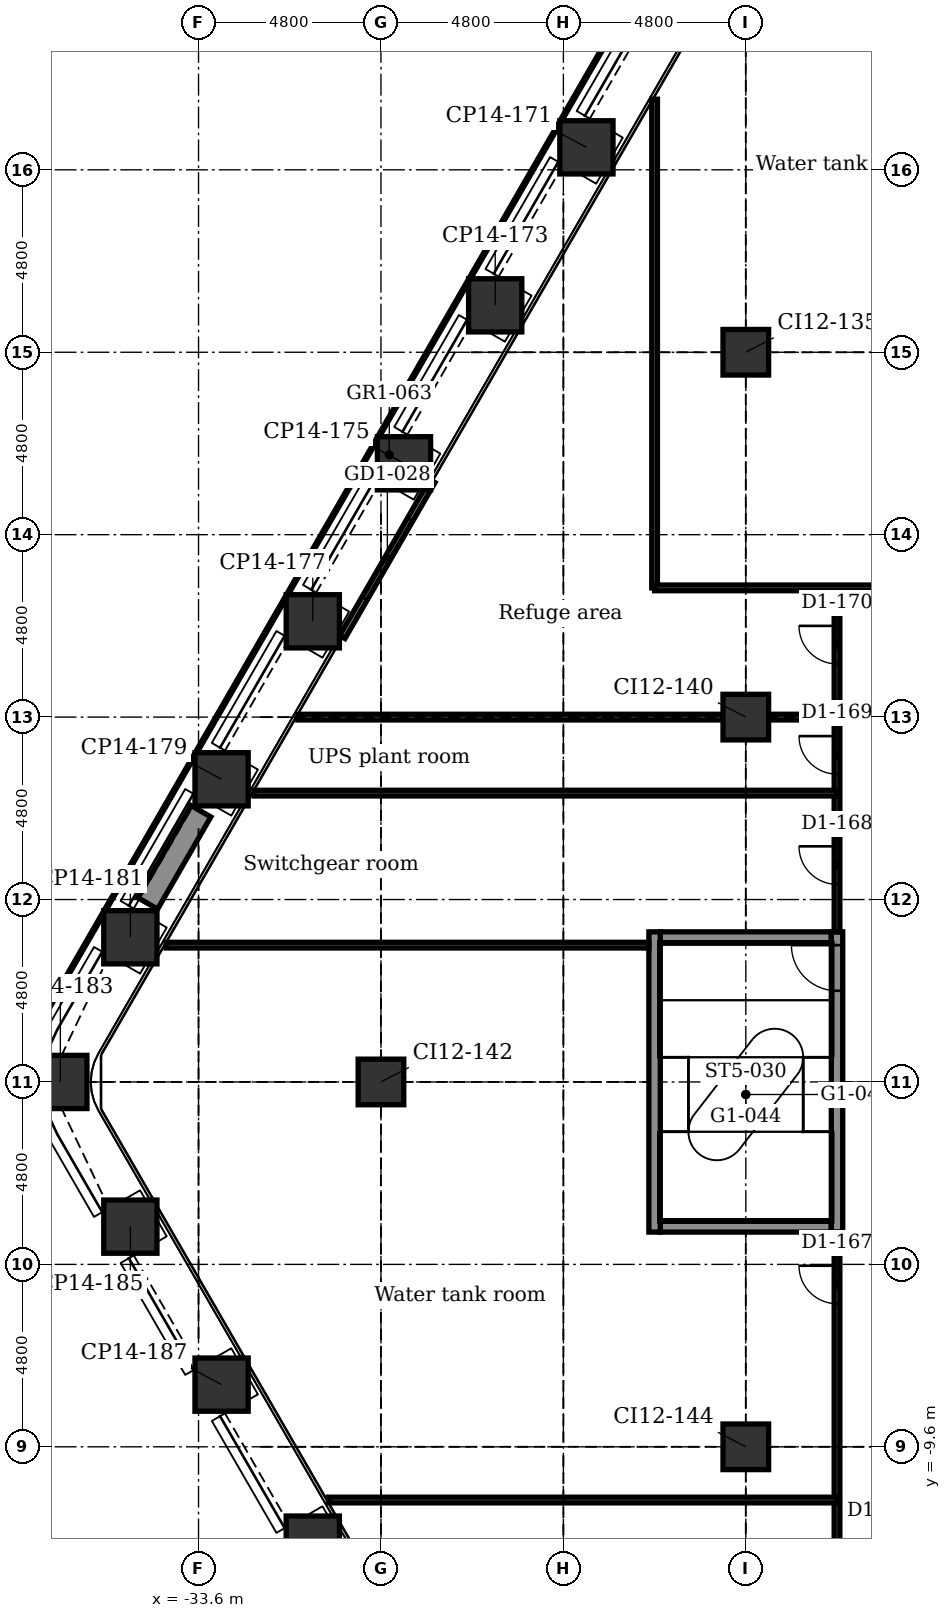
"""IFC4 building model, lengths in metres.
Left out: names, types, materials, properties, quantities, classifications, styles, units other than length and angle.
Written with IfcOpenShell. Run it as: python <this file> out.ifc"""

import sys

from ifc_helpers import new_model, si_unit, direction, frame, frame_2d, origin, origin_2d, place, context, subcontext, project, spatial, rectangle, extrude, element, fill, save


model = new_model("IFC4")
c1 = context("Model", 3, precision=1e-05, world=origin(), true_north=direction((0.0, 1.0)))
c2 = subcontext(c1, "Body", "Model", "MODEL_VIEW")
j1 = project(units=[si_unit("LENGTHUNIT", "METRE"), si_unit("PLANEANGLEUNIT", "RADIAN")], contexts=[c1])
p1 = place(None, origin())
s1 = spatial("IfcSite", under=j1, at=p1, CompositionType="ELEMENT")
p2 = place(p1, origin())
s2 = spatial("IfcBuilding", under=s1, at=p2, CompositionType="ELEMENT")
p3 = place(p2, frame((0.0, 0.0, 66.4)))
s3 = spatial("IfcBuildingStorey", under=s2, at=p3, CompositionType="ELEMENT", Elevation=66.4)
for number, where, z_axis, x_axis in (
    (1, (-30.594, -12.121, -0.3), (0.0, 0.0, 1.0), (0.866, 0.5, 0.0)),
    (2, (-32.994, -7.964, -0.3), (0.0, 0.0, 1.0), (0.866, 0.5, 0.0)),
    (3, (-35.394, -3.807, -0.3), (0.0, 0.0, 1.0), (0.866, 0.5, 0.0)),
    (4, (-37.236, 0.0, -0.3), (0.0, 0.0, 1.0), (1.0, 0.0, 0.0)),
    (5, (-35.394, 3.807, -0.3), (0.0, 0.0, 1.0), (0.5, 0.866, 0.0)),
    (6, (-32.994, 7.964, -0.3), (0.0, 0.0, 1.0), (0.5, 0.866, 0.0)),
    (7, (-30.594, 12.121, -0.3), (0.0, 0.0, 1.0), (0.5, 0.866, 0.0)),
    (8, (-28.194, 16.278, -0.3), (0.0, 0.0, 1.0), (0.5, 0.866, 0.0)),
    (9, (-25.794, 20.435, -0.3), (0.0, 0.0, 1.0), (0.5, 0.866, 0.0)),
    (10, (-23.394, 24.592, -0.3), (0.0, 0.0, 1.0), (0.5, 0.866, 0.0)),
):
    element("IfcColumn", number, at=place(p3, frame(where, z_axis=z_axis, x_axis=x_axis)), inside=s3, PredefinedType="COLUMN", context=c2, shape_type="SweptSolid", body=[
        extrude(rectangle(XDim=1.4, YDim=1.4, at=origin_2d()), origin(), (0.0, 0.0, 1.0), 5.5),
    ])
for number, where, z_axis, x_axis in (
    (11, (-28.8, 0.0, -0.3), (0.0, 0.0, 1.0), (1.0, 0.0, 0.0)),
    (12, (-19.2, -9.6, -0.3), (0.0, 0.0, 1.0), (1.0, 0.0, 0.0)),
    (13, (-19.2, 9.6, -0.3), (0.0, 0.0, 1.0), (1.0, 0.0, 0.0)),
    (14, (-19.2, 19.2, -0.3), (0.0, 0.0, 1.0), (1.0, 0.0, 0.0)),
):
    element("IfcColumn", number, at=place(p3, frame(where, z_axis=z_axis, x_axis=x_axis)), inside=s3, PredefinedType="COLUMN", context=c2, shape_type="SweptSolid", body=[
        extrude(rectangle(XDim=1.2, YDim=1.2, at=origin_2d()), origin(), (0.0, 0.0, 1.0), 5.5),
    ])
for number, where, z_axis, x_axis in (
    (15, (-21.45, -3.8, -0.3), (0.0, 0.0, 1.0), (1.0, 0.0, 0.0)),
    (16, (-21.45, 3.8, -0.3), (0.0, 0.0, 1.0), (1.0, 0.0, 0.0)),
):
    element("IfcWall", number, at=place(p3, frame(where, z_axis=z_axis, x_axis=x_axis)), inside=s3, PredefinedType="STANDARD", context=c2, shape_type="SweptSolid", body=[
        extrude(rectangle(XDim=4.5, YDim=0.3, at=frame_2d((2.25, 0.0))), origin(), (0.0, 0.0, 1.0), 5.5),
    ])
p4 = place(p3, frame((-21.6, -3.95, -0.3), z_axis=(0.0, 0.0, 1.0), x_axis=(0.0, 1.0, 0.0)))
e17 = element("IfcWall", 17, at=p4, inside=s3, PredefinedType="STANDARD", context=c2, shape_type="SweptSolid", body=[
    extrude(rectangle(XDim=7.9, YDim=0.3, at=frame_2d((3.95, 0.0))), origin(), (0.0, 0.0, 1.0), 5.5),
])
p5 = place(p3, frame((-16.8, -3.95, -0.3), z_axis=(0.0, 0.0, 1.0), x_axis=(0.0, 1.0, 0.0)))
e18 = element("IfcWall", 18, at=p5, inside=s3, PredefinedType="STANDARD", context=c2, shape_type="SweptSolid", body=[
    extrude(rectangle(XDim=7.9, YDim=0.3, at=frame_2d((3.95, 0.0))), origin(), (0.0, 0.0, 1.0), 5.5),
])
p6 = place(p5, frame((6.35, 0.0, 0.3)))
e19 = element("IfcOpeningElement", 19, at=p6, cuts=e18, PredefinedType="OPENING", context=c2, shape_type="SweptSolid", body=[
    extrude(rectangle(XDim=1.2, YDim=2.1, at=frame_2d((0.6, 1.05))), frame((0.0, 0.16, 0.0), z_axis=(0.0, -1.0, 0.0), x_axis=(1.0, 0.0, 0.0)), (0.0, 0.0, 1.0), 0.32),
])
p7 = place(p3, frame((-29.817, 11.707, 0.0), z_axis=(0.0, 0.0, 1.0), x_axis=(0.499978080042, 0.866038058908, 0.0)))
e20 = element("IfcWall", 20, at=p7, inside=s3, PredefinedType="PARTITIONING", context=c2, shape_type="SweptSolid", body=[
    extrude(rectangle(XDim=4.74, YDim=0.16, at=frame_2d((2.37, 0.0))), origin(), (0.0, 0.0, 1.0), 5.2),
])
p8 = place(p7, frame((1.17, 0.0, 0.0)))
e21 = element("IfcOpeningElement", 21, at=p8, cuts=e20, PredefinedType="OPENING", context=c2, shape_type="SweptSolid", body=[
    extrude(rectangle(XDim=2.4, YDim=2.4, at=frame_2d((1.2, 1.2))), frame((0.0, 0.09, 0.0), z_axis=(0.0, -1.0, 0.0), x_axis=(1.0, 0.0, 0.0)), (0.0, 0.0, 1.0), 0.18),
])
p9 = place(p3, frame((-34.937, 4.698, 0.0), z_axis=(0.0, 0.0, 1.0), x_axis=(0.49998411664, 0.866034573852, 0.0)))
e22 = element("IfcWall", 22, at=p9, inside=s3, PredefinedType="USERDEFINED", context=c2, shape_type="SweptSolid", body=[
    extrude(rectangle(XDim=2.8, YDim=0.6, at=frame_2d((1.4, 0.0))), origin(), (0.0, 0.0, 1.0), 0.7),
])
p10 = place(p3, frame((-16.8, -12.4, 0.0), z_axis=(0.0, 0.0, 1.0), x_axis=(0.0, 1.0, 0.0)))
e23 = element("IfcWall", 23, at=p10, inside=s3, PredefinedType="PARTITIONING", context=c2, shape_type="SweptSolid", body=[
    extrude(rectangle(XDim=8.45, YDim=0.15, at=frame_2d((4.225, 0.0))), origin(), (0.0, 0.0, 1.0), 5.2),
])
p11 = place(p10, frame((6.565, 0.0, 0.0)))
e24 = element("IfcOpeningElement", 24, at=p11, cuts=e23, PredefinedType="OPENING", context=c2, shape_type="SweptSolid", body=[
    extrude(rectangle(XDim=1.0, YDim=2.1, at=frame_2d((0.5, 1.05))), frame((0.0, 0.085, 0.0), z_axis=(0.0, -1.0, 0.0), x_axis=(1.0, 0.0, 0.0)), (0.0, 0.0, 1.0), 0.17),
])
p12 = place(p3, frame((-16.8, 3.95, 0.0), z_axis=(0.0, 0.0, 1.0), x_axis=(0.0, 1.0, 0.0)))
e25 = element("IfcWall", 25, at=p12, inside=s3, PredefinedType="PARTITIONING", context=c2, shape_type="SweptSolid", body=[
    extrude(rectangle(XDim=9.05, YDim=0.15, at=frame_2d((4.525, 0.0))), origin(), (0.0, 0.0, 1.0), 5.2),
])
p13 = place(p12, frame((1.25, 0.0, 0.0)))
e26 = element("IfcOpeningElement", 26, at=p13, cuts=e25, PredefinedType="OPENING", context=c2, shape_type="SweptSolid", body=[
    extrude(rectangle(XDim=1.0, YDim=2.1, at=frame_2d((0.5, 1.05))), frame((0.0, 0.085, 0.0), z_axis=(0.0, -1.0, 0.0), x_axis=(1.0, 0.0, 0.0)), (0.0, 0.0, 1.0), 0.17),
])
p14 = place(p12, frame((4.15, 0.0, 0.0)))
e27 = element("IfcOpeningElement", 27, at=p14, cuts=e25, PredefinedType="OPENING", context=c2, shape_type="SweptSolid", body=[
    extrude(rectangle(XDim=1.0, YDim=2.1, at=frame_2d((0.5, 1.05))), frame((0.0, 0.085, 0.0), z_axis=(0.0, -1.0, 0.0), x_axis=(1.0, 0.0, 0.0)), (0.0, 0.0, 1.0), 0.17),
])
p15 = place(p12, frame((7.05, 0.0, 0.0)))
e28 = element("IfcOpeningElement", 28, at=p15, cuts=e25, PredefinedType="OPENING", context=c2, shape_type="SweptSolid", body=[
    extrude(rectangle(XDim=1.0, YDim=2.1, at=frame_2d((0.5, 1.05))), frame((0.0, 0.085, 0.0), z_axis=(0.0, -1.0, 0.0), x_axis=(1.0, 0.0, 0.0)), (0.0, 0.0, 1.0), 0.17),
])
p16 = place(p3, frame((-21.6, 13.0, 0.0), z_axis=(0.0, 0.0, 1.0), x_axis=(0.0, 1.0, 0.0)))
e29 = element("IfcWall", 29, at=p16, inside=s3, PredefinedType="PARTITIONING", context=c2, shape_type="SweptSolid", body=[
    extrude(rectangle(XDim=12.858, YDim=0.15, at=frame_2d((6.429, 0.0))), origin(), (0.0, 0.0, 1.0), 5.2),
])
p17 = place(p3, frame((-30.178, -11.0, 0.0), z_axis=(0.0, 0.0, 1.0), x_axis=(1.0, 0.0, 0.0)))
e30 = element("IfcWall", 30, at=p17, inside=s3, PredefinedType="PARTITIONING", context=c2, shape_type="SweptSolid", body=[
    extrude(rectangle(XDim=13.378, YDim=0.15, at=frame_2d((6.689, 0.0))), origin(), (0.0, 0.0, 1.0), 5.2),
])
p18 = place(p3, frame((-34.451, 3.6, 0.0), z_axis=(0.0, 0.0, 1.0), x_axis=(1.0, 0.0, 0.0)))
e31 = element("IfcWall", 31, at=p18, inside=s3, PredefinedType="PARTITIONING", context=c2, shape_type="SweptSolid", body=[
    extrude(rectangle(XDim=12.701, YDim=0.15, at=frame_2d((6.351, 0.0))), origin(), (0.0, 0.0, 1.0), 5.2),
])
p19 = place(p3, frame((-32.142, 7.6, 0.0), z_axis=(0.0, 0.0, 1.0), x_axis=(1.0, 0.0, 0.0)))
e32 = element("IfcWall", 32, at=p19, inside=s3, PredefinedType="PARTITIONING", context=c2, shape_type="SweptSolid", body=[
    extrude(rectangle(XDim=15.342, YDim=0.15, at=frame_2d((7.671, 0.0))), origin(), (0.0, 0.0, 1.0), 5.2),
])
p20 = place(p3, frame((-30.987, 9.6, 0.0), z_axis=(0.0, 0.0, 1.0), x_axis=(1.0, 0.0, 0.0)))
e33 = element("IfcWall", 33, at=p20, inside=s3, PredefinedType="PARTITIONING", context=c2, shape_type="SweptSolid", body=[
    extrude(rectangle(XDim=11.187, YDim=0.15, at=frame_2d((5.593, 0.0))), origin(), (0.0, 0.0, 1.0), 4.438),
])
p21 = place(p3, frame((-18.6, 9.6, 0.0), z_axis=(0.0, 0.0, 1.0), x_axis=(1.0, 0.0, 0.0)))
e34 = element("IfcWall", 34, at=p21, inside=s3, PredefinedType="PARTITIONING", context=c2, shape_type="SweptSolid", body=[
    extrude(rectangle(XDim=1.8, YDim=0.15, at=frame_2d((0.9, 0.0))), origin(), (0.0, 0.0, 1.0), 4.592),
])
p22 = place(p3, frame((-21.6, 13.0, 0.0), z_axis=(0.0, 0.0, 1.0), x_axis=(1.0, 0.0, 0.0)))
e35 = element("IfcWall", 35, at=p22, inside=s3, PredefinedType="PARTITIONING", context=c2, shape_type="SweptSolid", body=[
    extrude(rectangle(XDim=43.2, YDim=0.15, at=frame_2d((21.6, 0.0))), origin(), (0.0, 0.0, 1.0), 5.2),
])
p23 = place(p22, frame((6.7, 0.0, 0.0)))
e36 = element("IfcOpeningElement", 36, at=p23, cuts=e35, PredefinedType="OPENING", context=c2, shape_type="SweptSolid", body=[
    extrude(rectangle(XDim=1.0, YDim=2.1, at=frame_2d((0.5, 1.05))), frame((0.0, 0.085, 0.0), z_axis=(0.0, -1.0, 0.0), x_axis=(1.0, 0.0, 0.0)), (0.0, 0.0, 1.0), 0.17),
])
p24 = place(p22, frame((10.3, 0.0, 0.0)))
e37 = element("IfcOpeningElement", 37, at=p24, cuts=e35, PredefinedType="OPENING", context=c2, shape_type="SweptSolid", body=[
    extrude(rectangle(XDim=1.0, YDim=2.1, at=frame_2d((0.5, 1.05))), frame((0.0, 0.085, 0.0), z_axis=(0.0, -1.0, 0.0), x_axis=(1.0, 0.0, 0.0)), (0.0, 0.0, 1.0), 0.17),
])
p25 = place(p22, frame((13.9, 0.0, 0.0)))
e38 = element("IfcOpeningElement", 38, at=p25, cuts=e35, PredefinedType="OPENING", context=c2, shape_type="SweptSolid", body=[
    extrude(rectangle(XDim=1.0, YDim=2.1, at=frame_2d((0.5, 1.05))), frame((0.0, 0.085, 0.0), z_axis=(0.0, -1.0, 0.0), x_axis=(1.0, 0.0, 0.0)), (0.0, 0.0, 1.0), 0.17),
])
p26 = place(p22, frame((18.7, 0.0, 0.0)))
e39 = element("IfcOpeningElement", 39, at=p26, cuts=e35, PredefinedType="OPENING", context=c2, shape_type="SweptSolid", body=[
    extrude(rectangle(XDim=1.0, YDim=2.1, at=frame_2d((0.5, 1.05))), frame((0.0, 0.085, 0.0), z_axis=(0.0, -1.0, 0.0), x_axis=(1.0, 0.0, 0.0)), (0.0, 0.0, 1.0), 0.17),
])
p27 = place(p22, frame((23.5, 0.0, 0.0)))
e40 = element("IfcOpeningElement", 40, at=p27, cuts=e35, PredefinedType="OPENING", context=c2, shape_type="SweptSolid", body=[
    extrude(rectangle(XDim=1.0, YDim=2.1, at=frame_2d((0.5, 1.05))), frame((0.0, 0.085, 0.0), z_axis=(0.0, -1.0, 0.0), x_axis=(1.0, 0.0, 0.0)), (0.0, 0.0, 1.0), 0.17),
])
p28 = place(p22, frame((28.3, 0.0, 0.0)))
e41 = element("IfcOpeningElement", 41, at=p28, cuts=e35, PredefinedType="OPENING", context=c2, shape_type="SweptSolid", body=[
    extrude(rectangle(XDim=1.0, YDim=2.1, at=frame_2d((0.5, 1.05))), frame((0.0, 0.085, 0.0), z_axis=(0.0, -1.0, 0.0), x_axis=(1.0, 0.0, 0.0)), (0.0, 0.0, 1.0), 0.17),
])
p29 = place(p22, frame((33.1, 0.0, 0.0)))
e42 = element("IfcOpeningElement", 42, at=p29, cuts=e35, PredefinedType="OPENING", context=c2, shape_type="SweptSolid", body=[
    extrude(rectangle(XDim=1.0, YDim=2.1, at=frame_2d((0.5, 1.05))), frame((0.0, 0.085, 0.0), z_axis=(0.0, -1.0, 0.0), x_axis=(1.0, 0.0, 0.0)), (0.0, 0.0, 1.0), 0.17),
])
p30 = place(p22, frame((36.7, 0.0, 0.0)))
e43 = element("IfcOpeningElement", 43, at=p30, cuts=e35, PredefinedType="OPENING", context=c2, shape_type="SweptSolid", body=[
    extrude(rectangle(XDim=1.0, YDim=2.1, at=frame_2d((0.5, 1.05))), frame((0.0, 0.085, 0.0), z_axis=(0.0, -1.0, 0.0), x_axis=(1.0, 0.0, 0.0)), (0.0, 0.0, 1.0), 0.17),
])
p31 = place(p8, origin())
e44 = element("IfcDoor", 44, at=p31, inside=s3, OperationType="DOUBLE_DOOR_SLIDING", PredefinedType="DOOR", context=c2, shape_type="SweptSolid", body=[
    extrude(rectangle(XDim=2.4, YDim=2.4, at=frame_2d((1.2, 1.2))), frame((0.0, 0.025, 0.0), z_axis=(0.0, -1.0, 0.0), x_axis=(1.0, 0.0, 0.0)), (0.0, 0.0, 1.0), 0.05),
])
fill(e21, e44)
p32 = place(p11, origin())
e45 = element("IfcDoor", 45, at=p32, inside=s3, OperationType="SINGLE_SWING_RIGHT", PredefinedType="DOOR", context=c2, shape_type="SweptSolid", body=[
    extrude(rectangle(XDim=1.0, YDim=2.1, at=frame_2d((0.5, 1.05))), frame((0.0, 0.025, 0.0), z_axis=(0.0, -1.0, 0.0), x_axis=(1.0, 0.0, 0.0)), (0.0, 0.0, 1.0), 0.05),
])
fill(e24, e45)
p33 = place(p13, origin())
e46 = element("IfcDoor", 46, at=p33, inside=s3, OperationType="SINGLE_SWING_RIGHT", PredefinedType="DOOR", context=c2, shape_type="SweptSolid", body=[
    extrude(rectangle(XDim=1.0, YDim=2.1, at=frame_2d((0.5, 1.05))), frame((0.0, 0.025, 0.0), z_axis=(0.0, -1.0, 0.0), x_axis=(1.0, 0.0, 0.0)), (0.0, 0.0, 1.0), 0.05),
])
fill(e26, e46)
p34 = place(p14, origin())
e47 = element("IfcDoor", 47, at=p34, inside=s3, OperationType="SINGLE_SWING_RIGHT", PredefinedType="DOOR", context=c2, shape_type="SweptSolid", body=[
    extrude(rectangle(XDim=1.0, YDim=2.1, at=frame_2d((0.5, 1.05))), frame((0.0, 0.025, 0.0), z_axis=(0.0, -1.0, 0.0), x_axis=(1.0, 0.0, 0.0)), (0.0, 0.0, 1.0), 0.05),
])
fill(e27, e47)
p35 = place(p15, origin())
e48 = element("IfcDoor", 48, at=p35, inside=s3, OperationType="SINGLE_SWING_RIGHT", PredefinedType="DOOR", context=c2, shape_type="SweptSolid", body=[
    extrude(rectangle(XDim=1.0, YDim=2.1, at=frame_2d((0.5, 1.05))), frame((0.0, 0.025, 0.0), z_axis=(0.0, -1.0, 0.0), x_axis=(1.0, 0.0, 0.0)), (0.0, 0.0, 1.0), 0.05),
])
fill(e28, e48)
p36 = place(p6, origin())
e49 = element("IfcDoor", 49, at=p36, inside=s3, OperationType="SINGLE_SWING_RIGHT", PredefinedType="DOOR", context=c2, shape_type="SweptSolid", body=[
    extrude(rectangle(XDim=1.2, YDim=2.1, at=frame_2d((0.6, 1.05))), frame((0.0, 0.025, 0.0), z_axis=(0.0, -1.0, 0.0), x_axis=(1.0, 0.0, 0.0)), (0.0, 0.0, 1.0), 0.05),
])
fill(e19, e49)
save(model, sys.argv[1])
